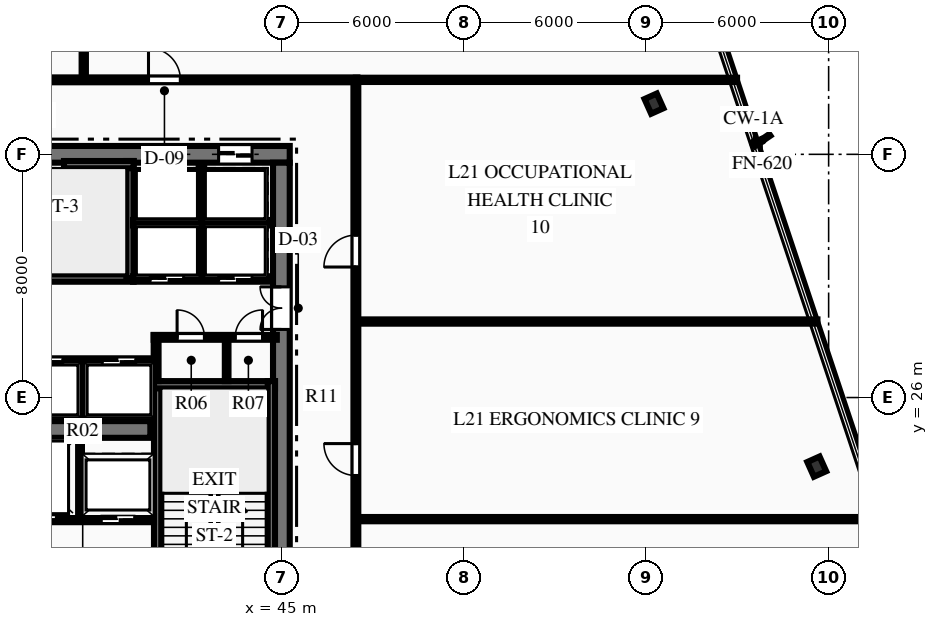
"""IFC4 building model, lengths in metres.
Left out: names, types, materials, properties, quantities, classifications, styles, units other than length and angle.
Written with IfcOpenShell. Run it as: python <this file> out.ifc"""

import sys

from ifc_helpers import new_model, si_unit, direction, frame, frame_2d, origin, origin_2d, place, context, subcontext, project, spatial, rectangle, i_section, extrude, element, fill, save


model = new_model("IFC4")
c1 = context("Model", 3, precision=1e-05, world=origin(), true_north=direction((0.0, 1.0)))
c2 = subcontext(c1, "Body", "Model", "MODEL_VIEW")
j1 = project(units=[si_unit("LENGTHUNIT", "METRE"), si_unit("PLANEANGLEUNIT", "RADIAN")], contexts=[c1])
p1 = place(None, origin())
s1 = spatial("IfcSite", under=j1, at=p1, CompositionType="ELEMENT")
p2 = place(p1, origin())
s2 = spatial("IfcBuilding", under=s1, at=p2, CompositionType="ELEMENT")
p3 = place(p2, frame((0.0, 0.0, 90.45)))
s3 = spatial("IfcBuildingStorey", under=s2, at=p3, CompositionType="ELEMENT", Elevation=90.45)
p4 = place(p3, frame((26.725, 34.0, 0.0), z_axis=(0.0, 0.0, 1.0), x_axis=(1.0, 0.0, 0.0)))
e1 = element("IfcWall", 1, at=p4, inside=s3, PredefinedType="SHEAR", context=c2, shape_type="SweptSolid", body=[
    extrude(rectangle(XDim=18.55, YDim=0.55, at=frame_2d((9.275, 0.0))), origin(), (0.0, 0.0, 1.0), 3.75),
])
p5 = place(p4, frame((1.24, 0.0, 0.0)))
e2 = element("IfcOpeningElement", 2, at=p5, cuts=e1, PredefinedType="OPENING", context=c2, shape_type="SweptSolid", body=[
    extrude(rectangle(XDim=1.1, YDim=2.15, at=frame_2d((0.55, 1.075))), frame((0.0, 0.285, 0.0), z_axis=(0.0, -1.0, 0.0), x_axis=(1.0, 0.0, 0.0)), (0.0, 0.0, 1.0), 0.57),
])
p6 = place(p4, frame((3.49, 0.0, 0.0)))
e3 = element("IfcOpeningElement", 3, at=p6, cuts=e1, PredefinedType="OPENING", context=c2, shape_type="SweptSolid", body=[
    extrude(rectangle(XDim=1.1, YDim=2.15, at=frame_2d((0.55, 1.075))), frame((0.0, 0.285, 0.0), z_axis=(0.0, -1.0, 0.0), x_axis=(1.0, 0.0, 0.0)), (0.0, 0.0, 1.0), 0.57),
])
p7 = place(p4, frame((13.96, 0.0, 0.0)))
e4 = element("IfcOpeningElement", 4, at=p7, cuts=e1, PredefinedType="OPENING", context=c2, shape_type="SweptSolid", body=[
    extrude(rectangle(XDim=1.1, YDim=2.15, at=frame_2d((0.55, 1.075))), frame((0.0, 0.285, 0.0), z_axis=(0.0, -1.0, 0.0), x_axis=(1.0, 0.0, 0.0)), (0.0, 0.0, 1.0), 0.57),
])
p8 = place(p4, frame((16.21, 0.0, 0.0)))
e5 = element("IfcOpeningElement", 5, at=p8, cuts=e1, PredefinedType="OPENING", context=c2, shape_type="SweptSolid", body=[
    extrude(rectangle(XDim=1.1, YDim=2.15, at=frame_2d((0.55, 1.075))), frame((0.0, 0.285, 0.0), z_axis=(0.0, -1.0, 0.0), x_axis=(1.0, 0.0, 0.0)), (0.0, 0.0, 1.0), 0.57),
])
p9 = place(p3, frame((45.0, 18.275, 0.0), z_axis=(0.0, 0.0, 1.0), x_axis=(0.0, 1.0, 0.0)))
e6 = element("IfcWall", 6, at=p9, inside=s3, PredefinedType="SHEAR", context=c2, shape_type="SweptSolid", body=[
    extrude(rectangle(XDim=15.45, YDim=0.55, at=frame_2d((7.725, 0.0))), origin(), (0.0, 0.0, 1.0), 3.75),
])
p10 = place(p9, frame((9.965, 0.0, 0.0)))
e7 = element("IfcOpeningElement", 7, at=p10, cuts=e6, PredefinedType="OPENING", context=c2, shape_type="SweptSolid", body=[
    extrude(rectangle(XDim=1.4, YDim=2.2, at=frame_2d((0.7, 1.1))), frame((0.0, 0.285, 0.0), z_axis=(0.0, -1.0, 0.0), x_axis=(1.0, 0.0, 0.0)), (0.0, 0.0, 1.0), 0.57),
])
p11 = place(p3, frame((31.31, 24.95, 0.0), z_axis=(0.0, 0.0, 1.0), x_axis=(1.0, 0.0, 0.0)))
e8 = element("IfcWall", 8, at=p11, inside=s3, PredefinedType="SHEAR", context=c2, shape_type="SweptSolid", body=[
    extrude(rectangle(XDim=9.38, YDim=0.55, at=frame_2d((4.69, 0.0))), origin(), (0.0, 0.0, 1.0), 3.75),
])
p12 = place(p3, frame((40.93, 18.28, 0.0), z_axis=(0.0, 0.0, 1.0), x_axis=(0.0, 1.0, 0.0)))
e9 = element("IfcWall", 9, at=p12, inside=s3, PredefinedType="SHEAR", context=c2, shape_type="SweptSolid", body=[
    extrude(rectangle(XDim=8.26, YDim=0.24, at=frame_2d((4.13, 0.0))), origin(), (0.0, 0.0, 1.0), 3.75),
])
p13 = place(p12, frame((0.365, 0.0, 0.0)))
e10 = element("IfcOpeningElement", 10, at=p13, cuts=e9, PredefinedType="OPENING", context=c2, shape_type="SweptSolid", body=[
    extrude(rectangle(XDim=1.05, YDim=2.15, at=frame_2d((0.525, 1.075))), frame((0.0, 0.13, 0.0), z_axis=(0.0, -1.0, 0.0), x_axis=(1.0, 0.0, 0.0)), (0.0, 0.0, 1.0), 0.26),
])
p14 = place(p3, frame((40.81, 26.42, 0.0), z_axis=(0.0, 0.0, 1.0), x_axis=(1.0, 0.0, 0.0)))
e11 = element("IfcWall", 11, at=p14, inside=s3, PredefinedType="SHEAR", context=c2, shape_type="SweptSolid", body=[
    extrude(rectangle(XDim=3.98, YDim=0.24, at=frame_2d((1.99, 0.0))), origin(), (0.0, 0.0, 1.0), 3.75),
])
p15 = place(p3, frame((44.67, 18.28, 0.0), z_axis=(0.0, 0.0, 1.0), x_axis=(0.0, 1.0, 0.0)))
e12 = element("IfcWall", 12, at=p15, inside=s3, PredefinedType="SHEAR", context=c2, shape_type="SweptSolid", body=[
    extrude(rectangle(XDim=8.26, YDim=0.24, at=frame_2d((4.13, 0.0))), origin(), (0.0, 0.0, 1.0), 3.75),
])
p16 = place(p3, frame((31.76, 29.93, 0.0), z_axis=(0.0, 0.0, 1.0), x_axis=(1.0, 0.0, 0.0)))
e13 = element("IfcWall", 13, at=p16, inside=s3, PredefinedType="SHEAR", context=c2, shape_type="SweptSolid", body=[
    extrude(rectangle(XDim=8.38, YDim=0.24, at=frame_2d((4.19, 0.0))), origin(), (0.0, 0.0, 1.0), 3.75),
])
p17 = place(p16, frame((0.565, 0.0, 0.0)))
e14 = element("IfcOpeningElement", 14, at=p17, cuts=e13, PredefinedType="OPENING", context=c2, shape_type="SweptSolid", body=[
    extrude(rectangle(XDim=1.05, YDim=2.15, at=frame_2d((0.525, 1.075))), frame((0.0, 0.13, 0.0), z_axis=(0.0, -1.0, 0.0), x_axis=(1.0, 0.0, 0.0)), (0.0, 0.0, 1.0), 0.26),
])
p18 = place(p3, frame((40.02, 29.93, 0.0), z_axis=(0.0, 0.0, 1.0), x_axis=(0.0, 1.0, 0.0)))
e15 = element("IfcWall", 15, at=p18, inside=s3, PredefinedType="SHEAR", context=c2, shape_type="SweptSolid", body=[
    extrude(rectangle(XDim=3.85, YDim=0.24, at=frame_2d((1.925, 0.0))), origin(), (0.0, 0.0, 1.0), 3.75),
])
p19 = place(p3, frame((37.85, 33.66, 0.0), z_axis=(0.0, 0.0, 1.0), x_axis=(1.0, 0.0, 0.0)))
e16 = element("IfcWall", 16, at=p19, inside=s3, PredefinedType="SHEAR", context=c2, shape_type="SweptSolid", body=[
    extrude(rectangle(XDim=2.29, YDim=0.24, at=frame_2d((1.145, 0.0))), origin(), (0.0, 0.0, 1.0), 3.75),
])
for number, where, z_axis, x_axis in (
    (17, (62.609, 23.727, 0.0), (0.0, 0.0, 1.0), (0.912, 0.409, 0.0)),
    (18, (57.255, 35.667, 0.0), (0.0, 0.0, 1.0), (0.912, 0.409, 0.0)),
):
    element("IfcColumn", number, at=place(p3, frame(where, z_axis=z_axis, x_axis=x_axis)), inside=s3, PredefinedType="COLUMN", context=c2, shape_type="SweptSolid", body=[
        extrude(i_section(OverallWidth=0.442, OverallDepth=0.531, WebThickness=0.066, FlangeThickness=0.106, at=origin_2d()), origin(), (0.0, 0.0, 1.0), 3.75),
    ])
p20 = place(p3, frame((36.12, 22.0, 0.0), z_axis=(0.0, 0.0, 1.0), x_axis=(1.0, 0.0, 0.0)))
e19 = element("IfcWall", 19, at=p20, inside=s3, PredefinedType="PARTITIONING", context=c2, shape_type="SweptSolid", body=[
    extrude(rectangle(XDim=4.69, YDim=0.2, at=frame_2d((2.345, 0.0))), origin(), (0.0, 0.0, 1.0), 3.45),
])
p21 = place(p20, frame((2.955, 0.0, 0.0)))
e20 = element("IfcOpeningElement", 20, at=p21, cuts=e19, PredefinedType="OPENING", context=c2, shape_type="SweptSolid", body=[
    extrude(rectangle(XDim=1.1, YDim=2.15, at=frame_2d((0.55, 1.075))), frame((0.0, 0.11, 0.0), z_axis=(0.0, -1.0, 0.0), x_axis=(1.0, 0.0, 0.0)), (0.0, 0.0, 1.0), 0.22),
])
p22 = place(p20, frame((0.08, 0.0, 0.0)))
e21 = element("IfcOpeningElement", 21, at=p22, cuts=e19, PredefinedType="OPENING", context=c2, shape_type="SweptSolid", body=[
    extrude(rectangle(XDim=1.4, YDim=2.2, at=frame_2d((0.7, 1.1))), frame((0.0, 0.11, 0.0), z_axis=(0.0, -1.0, 0.0), x_axis=(1.0, 0.0, 0.0)), (0.0, 0.0, 1.0), 0.22),
])
p23 = place(p3, frame((38.35, 22.05, 0.0), z_axis=(0.0, 0.0, 1.0), x_axis=(0.0, 1.0, 0.0)))
e22 = element("IfcWall", 22, at=p23, inside=s3, PredefinedType="PARTITIONING", context=c2, shape_type="SweptSolid", body=[
    extrude(rectangle(XDim=2.6, YDim=0.18, at=frame_2d((1.3, 0.0))), origin(), (0.0, 0.0, 1.0), 3.45),
])
p24 = place(p3, frame((40.8, 27.98, 0.0), z_axis=(0.0, 0.0, 1.0), x_axis=(1.0, 0.0, 0.0)))
e23 = element("IfcWall", 23, at=p24, inside=s3, PredefinedType="PARTITIONING", context=c2, shape_type="SweptSolid", body=[
    extrude(rectangle(XDim=4.05, YDim=0.16, at=frame_2d((2.025, 0.0))), origin(), (0.0, 0.0, 1.0), 3.45),
])
p25 = place(p24, frame((0.77, 0.0, 0.0)))
e24 = element("IfcOpeningElement", 24, at=p25, cuts=e23, PredefinedType="OPENING", context=c2, shape_type="SweptSolid", body=[
    extrude(rectangle(XDim=0.9, YDim=2.15, at=frame_2d((0.45, 1.075))), frame((0.0, 0.09, 0.0), z_axis=(0.0, -1.0, 0.0), x_axis=(1.0, 0.0, 0.0)), (0.0, 0.0, 1.0), 0.18),
])
p26 = place(p24, frame((2.68, 0.0, 0.0)))
e25 = element("IfcOpeningElement", 25, at=p26, cuts=e23, PredefinedType="OPENING", context=c2, shape_type="SweptSolid", body=[
    extrude(rectangle(XDim=0.9, YDim=2.15, at=frame_2d((0.45, 1.075))), frame((0.0, 0.09, 0.0), z_axis=(0.0, -1.0, 0.0), x_axis=(1.0, 0.0, 0.0)), (0.0, 0.0, 1.0), 0.18),
])
p27 = place(p3, frame((40.88, 26.54, 0.0), z_axis=(0.0, 0.0, 1.0), x_axis=(0.0, 1.0, 0.0)))
e26 = element("IfcWall", 26, at=p27, inside=s3, PredefinedType="PARTITIONING", context=c2, shape_type="SweptSolid", body=[
    extrude(rectangle(XDim=1.51, YDim=0.16, at=frame_2d((0.755, 0.0))), origin(), (0.0, 0.0, 1.0), 3.45),
])
p28 = place(p3, frame((43.2, 26.54, 0.0), z_axis=(0.0, 0.0, 1.0), x_axis=(0.0, 1.0, 0.0)))
e27 = element("IfcWall", 27, at=p28, inside=s3, PredefinedType="PARTITIONING", context=c2, shape_type="SweptSolid", body=[
    extrude(rectangle(XDim=1.44, YDim=0.12, at=frame_2d((0.72, 0.0))), origin(), (0.0, 0.0, 1.0), 3.45),
])
p29 = place(p3, frame((40.12, 29.9, 0.0), z_axis=(0.0, 0.0, 1.0), x_axis=(1.0, 0.0, 0.0)))
e28 = element("IfcWall", 28, at=p29, inside=s3, PredefinedType="PARTITIONING", context=c2, shape_type="SweptSolid", body=[
    extrude(rectangle(XDim=4.43, YDim=0.18, at=frame_2d((2.215, 0.0))), origin(), (0.0, 0.0, 1.0), 3.45),
])
p30 = place(p29, frame((0.565, 0.0, 0.0)))
e29 = element("IfcOpeningElement", 29, at=p30, cuts=e28, PredefinedType="OPENING", context=c2, shape_type="SweptSolid", body=[
    extrude(rectangle(XDim=1.1, YDim=2.15, at=frame_2d((0.55, 1.075))), frame((0.0, 0.1, 0.0), z_axis=(0.0, -1.0, 0.0), x_axis=(1.0, 0.0, 0.0)), (0.0, 0.0, 1.0), 0.2),
])
p31 = place(p29, frame((2.815, 0.0, 0.0)))
e30 = element("IfcOpeningElement", 30, at=p31, cuts=e28, PredefinedType="OPENING", context=c2, shape_type="SweptSolid", body=[
    extrude(rectangle(XDim=1.1, YDim=2.15, at=frame_2d((0.55, 1.075))), frame((0.0, 0.1, 0.0), z_axis=(0.0, -1.0, 0.0), x_axis=(1.0, 0.0, 0.0)), (0.0, 0.0, 1.0), 0.2),
])
p32 = place(p3, frame((40.12, 31.75, 0.0), z_axis=(0.0, 0.0, 1.0), x_axis=(1.0, 0.0, 0.0)))
e31 = element("IfcWall", 31, at=p32, inside=s3, PredefinedType="PARTITIONING", context=c2, shape_type="SweptSolid", body=[
    extrude(rectangle(XDim=4.43, YDim=0.18, at=frame_2d((2.215, 0.0))), origin(), (0.0, 0.0, 1.0), 3.45),
])
p33 = place(p3, frame((42.37, 29.9, 0.0), z_axis=(0.0, 0.0, 1.0), x_axis=(0.0, 1.0, 0.0)))
e32 = element("IfcWall", 32, at=p33, inside=s3, PredefinedType="PARTITIONING", context=c2, shape_type="SweptSolid", body=[
    extrude(rectangle(XDim=3.75, YDim=0.18, at=frame_2d((1.875, 0.0))), origin(), (0.0, 0.0, 1.0), 3.45),
])
p34 = place(p3, frame((31.2, 27.2, 0.0), z_axis=(0.0, 0.0, 1.0), x_axis=(1.0, 0.0, 0.0)))
e33 = element("IfcWall", 33, at=p34, inside=s3, PredefinedType="PARTITIONING", context=c2, shape_type="SweptSolid", body=[
    extrude(rectangle(XDim=9.6, YDim=0.18, at=frame_2d((4.8, 0.0))), origin(), (0.0, 0.0, 1.0), 3.45),
])
p35 = place(p34, frame((0.59, 0.0, 0.0)))
e34 = element("IfcOpeningElement", 34, at=p35, cuts=e33, PredefinedType="OPENING", context=c2, shape_type="SweptSolid", body=[
    extrude(rectangle(XDim=1.1, YDim=2.15, at=frame_2d((0.55, 1.075))), frame((0.0, 0.1, 0.0), z_axis=(0.0, -1.0, 0.0), x_axis=(1.0, 0.0, 0.0)), (0.0, 0.0, 1.0), 0.2),
])
p36 = place(p34, frame((2.99, 0.0, 0.0)))
e35 = element("IfcOpeningElement", 35, at=p36, cuts=e33, PredefinedType="OPENING", context=c2, shape_type="SweptSolid", body=[
    extrude(rectangle(XDim=1.1, YDim=2.15, at=frame_2d((0.55, 1.075))), frame((0.0, 0.1, 0.0), z_axis=(0.0, -1.0, 0.0), x_axis=(1.0, 0.0, 0.0)), (0.0, 0.0, 1.0), 0.2),
])
p37 = place(p34, frame((5.51, 0.0, 0.0)))
e36 = element("IfcOpeningElement", 36, at=p37, cuts=e33, PredefinedType="OPENING", context=c2, shape_type="SweptSolid", body=[
    extrude(rectangle(XDim=1.1, YDim=2.15, at=frame_2d((0.55, 1.075))), frame((0.0, 0.1, 0.0), z_axis=(0.0, -1.0, 0.0), x_axis=(1.0, 0.0, 0.0)), (0.0, 0.0, 1.0), 0.2),
])
p38 = place(p34, frame((7.91, 0.0, 0.0)))
e37 = element("IfcOpeningElement", 37, at=p38, cuts=e33, PredefinedType="OPENING", context=c2, shape_type="SweptSolid", body=[
    extrude(rectangle(XDim=1.1, YDim=2.15, at=frame_2d((0.55, 1.075))), frame((0.0, 0.1, 0.0), z_axis=(0.0, -1.0, 0.0), x_axis=(1.0, 0.0, 0.0)), (0.0, 0.0, 1.0), 0.2),
])
p39 = place(p3, frame((38.46, 25.3, 0.0), z_axis=(0.0, 0.0, 1.0), x_axis=(0.0, 1.0, 0.0)))
e38 = element("IfcWall", 38, at=p39, inside=s3, PredefinedType="PARTITIONING", context=c2, shape_type="SweptSolid", body=[
    extrude(rectangle(XDim=1.9, YDim=0.18, at=frame_2d((0.95, 0.0))), origin(), (0.0, 0.0, 1.0), 3.45),
])
p40 = place(p3, frame((24.5, 36.45, 0.0), z_axis=(0.0, 0.0, 1.0), x_axis=(1.0, 0.0, 0.0)))
e39 = element("IfcWall", 39, at=p40, inside=s3, PredefinedType="PARTITIONING", context=c2, shape_type="SweptSolid", body=[
    extrude(rectangle(XDim=23.0, YDim=0.16, at=frame_2d((11.5, 0.0))), origin(), (0.0, 0.0, 1.0), 3.45),
])
p41 = place(p40, frame((0.53, 0.0, 0.0)))
e40 = element("IfcOpeningElement", 40, at=p41, cuts=e39, PredefinedType="OPENING", context=c2, shape_type="SweptSolid", body=[
    extrude(rectangle(XDim=1.05, YDim=2.15, at=frame_2d((0.525, 1.075))), frame((0.0, 0.09, 0.0), z_axis=(0.0, -1.0, 0.0), x_axis=(1.0, 0.0, 0.0)), (0.0, 0.0, 1.0), 0.18),
])
p42 = place(p40, frame((9.755, 0.0, 0.0)))
e41 = element("IfcOpeningElement", 41, at=p42, cuts=e39, PredefinedType="OPENING", context=c2, shape_type="SweptSolid", body=[
    extrude(rectangle(XDim=1.05, YDim=2.15, at=frame_2d((0.525, 1.075))), frame((0.0, 0.09, 0.0), z_axis=(0.0, -1.0, 0.0), x_axis=(1.0, 0.0, 0.0)), (0.0, 0.0, 1.0), 0.18),
])
p43 = place(p40, frame((16.129, 0.0, 0.0)))
e42 = element("IfcOpeningElement", 42, at=p43, cuts=e39, PredefinedType="OPENING", context=c2, shape_type="SweptSolid", body=[
    extrude(rectangle(XDim=1.05, YDim=2.15, at=frame_2d((0.525, 1.075))), frame((0.0, 0.09, 0.0), z_axis=(0.0, -1.0, 0.0), x_axis=(1.0, 0.0, 0.0)), (0.0, 0.0, 1.0), 0.18),
])
p44 = place(p3, frame((47.45, 15.55, 0.0), z_axis=(0.0, 0.0, 1.0), x_axis=(0.0, 1.0, 0.0)))
e43 = element("IfcWall", 43, at=p44, inside=s3, PredefinedType="PARTITIONING", context=c2, shape_type="SweptSolid", body=[
    extrude(rectangle(XDim=20.9, YDim=0.16, at=frame_2d((10.45, 0.0))), origin(), (0.0, 0.0, 1.0), 3.45),
])
p45 = place(p44, frame((4.087, 0.0, 0.0)))
e44 = element("IfcOpeningElement", 44, at=p45, cuts=e43, PredefinedType="OPENING", context=c2, shape_type="SweptSolid", body=[
    extrude(rectangle(XDim=1.05, YDim=2.15, at=frame_2d((0.525, 1.075))), frame((0.0, 0.09, 0.0), z_axis=(0.0, -1.0, 0.0), x_axis=(1.0, 0.0, 0.0)), (0.0, 0.0, 1.0), 0.18),
])
p46 = place(p44, frame((7.885, 0.0, 0.0)))
e45 = element("IfcOpeningElement", 45, at=p46, cuts=e43, PredefinedType="OPENING", context=c2, shape_type="SweptSolid", body=[
    extrude(rectangle(XDim=1.05, YDim=2.15, at=frame_2d((0.525, 1.075))), frame((0.0, 0.09, 0.0), z_axis=(0.0, -1.0, 0.0), x_axis=(1.0, 0.0, 0.0)), (0.0, 0.0, 1.0), 0.18),
])
p47 = place(p44, frame((14.743, 0.0, 0.0)))
e46 = element("IfcOpeningElement", 46, at=p47, cuts=e43, PredefinedType="OPENING", context=c2, shape_type="SweptSolid", body=[
    extrude(rectangle(XDim=1.05, YDim=2.15, at=frame_2d((0.525, 1.075))), frame((0.0, 0.09, 0.0), z_axis=(0.0, -1.0, 0.0), x_axis=(1.0, 0.0, 0.0)), (0.0, 0.0, 1.0), 0.18),
])
p48 = place(p3, frame((47.45, 36.45, 0.0), z_axis=(0.0, 0.0, 1.0), x_axis=(1.0, 0.0, 0.0)))
e47 = element("IfcWall", 47, at=p48, inside=s3, PredefinedType="PARTITIONING", context=c2, shape_type="SweptSolid", body=[
    extrude(rectangle(XDim=12.538, YDim=0.14, at=frame_2d((6.269, 0.0))), origin(), (0.0, 0.0, 1.0), 3.45),
])
p49 = place(p3, frame((38.5, 36.45, 0.0), z_axis=(0.0, 0.0, 1.0), x_axis=(0.0, 1.0, 0.0)))
e48 = element("IfcWall", 48, at=p49, inside=s3, PredefinedType="PARTITIONING", context=c2, shape_type="SweptSolid", body=[
    extrude(rectangle(XDim=16.581, YDim=0.14, at=frame_2d((8.291, 0.0))), origin(), (0.0, 0.0, 1.0), 3.45),
])
p50 = place(p3, frame((47.45, 22.0, 0.0), z_axis=(0.0, 0.0, 1.0), x_axis=(1.0, 0.0, 0.0)))
e49 = element("IfcWall", 49, at=p50, inside=s3, PredefinedType="PARTITIONING", context=c2, shape_type="SweptSolid", body=[
    extrude(rectangle(XDim=17.345, YDim=0.14, at=frame_2d((8.672, 0.0))), origin(), (0.0, 0.0, 1.0), 3.45),
])
p51 = place(p3, frame((47.45, 28.5, 0.0), z_axis=(0.0, 0.0, 1.0), x_axis=(1.0, 0.0, 0.0)))
e50 = element("IfcWall", 50, at=p51, inside=s3, PredefinedType="PARTITIONING", context=c2, shape_type="SweptSolid", body=[
    extrude(rectangle(XDim=15.183, YDim=0.14, at=frame_2d((7.591, 0.0))), origin(), (0.0, 0.0, 1.0), 3.45),
])
p52 = place(p25, origin())
e51 = element("IfcDoor", 51, at=p52, inside=s3, OperationType="SINGLE_SWING_LEFT", PredefinedType="DOOR", context=c2, shape_type="SweptSolid", body=[
    extrude(rectangle(XDim=0.9, YDim=2.15, at=frame_2d((0.45, 1.075))), frame((0.0, 0.025, 0.0), z_axis=(0.0, -1.0, 0.0), x_axis=(1.0, 0.0, 0.0)), (0.0, 0.0, 1.0), 0.05),
])
fill(e24, e51)
p53 = place(p26, origin())
e52 = element("IfcDoor", 52, at=p53, inside=s3, OperationType="SINGLE_SWING_RIGHT", PredefinedType="DOOR", context=c2, shape_type="SweptSolid", body=[
    extrude(rectangle(XDim=0.9, YDim=2.15, at=frame_2d((0.45, 1.075))), frame((0.0, 0.025, 0.0), z_axis=(0.0, -1.0, 0.0), x_axis=(1.0, 0.0, 0.0)), (0.0, 0.0, 1.0), 0.05),
])
fill(e25, e52)
p54 = place(p10, origin())
e53 = element("IfcDoor", 53, at=p54, inside=s3, OperationType="DOUBLE_DOOR_SINGLE_SWING", PredefinedType="DOOR", context=c2, shape_type="SweptSolid", body=[
    extrude(rectangle(XDim=1.4, YDim=2.2, at=frame_2d((0.7, 1.1))), frame((0.0, 0.025, 0.0), z_axis=(0.0, -1.0, 0.0), x_axis=(1.0, 0.0, 0.0)), (0.0, 0.0, 1.0), 0.05),
])
fill(e7, e53)
p55 = place(p43, origin())
e54 = element("IfcDoor", 54, at=p55, inside=s3, OperationType="SINGLE_SWING_LEFT", PredefinedType="DOOR", context=c2, shape_type="SweptSolid", body=[
    extrude(rectangle(XDim=1.05, YDim=2.15, at=frame_2d((0.525, 1.075))), frame((0.0, 0.025, 0.0), z_axis=(0.0, -1.0, 0.0), x_axis=(1.0, 0.0, 0.0)), (0.0, 0.0, 1.0), 0.05),
])
fill(e42, e54)
p56 = place(p46, origin())
e55 = element("IfcDoor", 55, at=p56, inside=s3, OperationType="SINGLE_SWING_RIGHT", PredefinedType="DOOR", context=c2, shape_type="SweptSolid", body=[
    extrude(rectangle(XDim=1.05, YDim=2.15, at=frame_2d((0.525, 1.075))), frame((0.0, 0.025, 0.0), z_axis=(0.0, -1.0, 0.0), x_axis=(1.0, 0.0, 0.0)), (0.0, 0.0, 1.0), 0.05),
])
fill(e45, e55)
p57 = place(p47, origin())
e56 = element("IfcDoor", 56, at=p57, inside=s3, OperationType="SINGLE_SWING_LEFT", PredefinedType="DOOR", context=c2, shape_type="SweptSolid", body=[
    extrude(rectangle(XDim=1.05, YDim=2.15, at=frame_2d((0.525, 1.075))), frame((0.0, 0.025, 0.0), z_axis=(0.0, -1.0, 0.0), x_axis=(1.0, 0.0, 0.0)), (0.0, 0.0, 1.0), 0.05),
])
fill(e46, e56)
p58 = place(p30, origin())
e57 = element("IfcDoor", 57, at=p58, inside=s3, OperationType="SLIDING_TO_LEFT", PredefinedType="DOOR", context=c2, shape_type="SweptSolid", body=[
    extrude(rectangle(XDim=1.1, YDim=2.15, at=frame_2d((0.55, 1.075))), frame((0.0, 0.025, 0.0), z_axis=(0.0, -1.0, 0.0), x_axis=(1.0, 0.0, 0.0)), (0.0, 0.0, 1.0), 0.05),
])
fill(e29, e57)
p59 = place(p31, origin())
e58 = element("IfcDoor", 58, at=p59, inside=s3, OperationType="SLIDING_TO_LEFT", PredefinedType="DOOR", context=c2, shape_type="SweptSolid", body=[
    extrude(rectangle(XDim=1.1, YDim=2.15, at=frame_2d((0.55, 1.075))), frame((0.0, 0.025, 0.0), z_axis=(0.0, -1.0, 0.0), x_axis=(1.0, 0.0, 0.0)), (0.0, 0.0, 1.0), 0.05),
])
fill(e30, e58)
p60 = place(p7, origin())
e59 = element("IfcDoor", 59, at=p60, inside=s3, OperationType="SLIDING_TO_LEFT", PredefinedType="DOOR", context=c2, shape_type="SweptSolid", body=[
    extrude(rectangle(XDim=1.1, YDim=2.15, at=frame_2d((0.55, 1.075))), frame((0.0, 0.025, 0.0), z_axis=(0.0, -1.0, 0.0), x_axis=(1.0, 0.0, 0.0)), (0.0, 0.0, 1.0), 0.05),
])
fill(e4, e59)
p61 = place(p8, origin())
e60 = element("IfcDoor", 60, at=p61, inside=s3, OperationType="SLIDING_TO_LEFT", PredefinedType="DOOR", context=c2, shape_type="SweptSolid", body=[
    extrude(rectangle(XDim=1.1, YDim=2.15, at=frame_2d((0.55, 1.075))), frame((0.0, 0.025, 0.0), z_axis=(0.0, -1.0, 0.0), x_axis=(1.0, 0.0, 0.0)), (0.0, 0.0, 1.0), 0.05),
])
fill(e5, e60)
p62 = place(p37, origin())
e61 = element("IfcDoor", 61, at=p62, inside=s3, OperationType="SLIDING_TO_LEFT", PredefinedType="DOOR", context=c2, shape_type="SweptSolid", body=[
    extrude(rectangle(XDim=1.1, YDim=2.15, at=frame_2d((0.55, 1.075))), frame((0.0, 0.025, 0.0), z_axis=(0.0, -1.0, 0.0), x_axis=(1.0, 0.0, 0.0)), (0.0, 0.0, 1.0), 0.05),
])
fill(e36, e61)
p63 = place(p38, origin())
e62 = element("IfcDoor", 62, at=p63, inside=s3, OperationType="SLIDING_TO_LEFT", PredefinedType="DOOR", context=c2, shape_type="SweptSolid", body=[
    extrude(rectangle(XDim=1.1, YDim=2.15, at=frame_2d((0.55, 1.075))), frame((0.0, 0.025, 0.0), z_axis=(0.0, -1.0, 0.0), x_axis=(1.0, 0.0, 0.0)), (0.0, 0.0, 1.0), 0.05),
])
fill(e37, e62)
p64 = place(p21, origin())
e63 = element("IfcDoor", 63, at=p64, inside=s3, OperationType="SLIDING_TO_LEFT", PredefinedType="DOOR", context=c2, shape_type="SweptSolid", body=[
    extrude(rectangle(XDim=1.1, YDim=2.15, at=frame_2d((0.55, 1.075))), frame((0.0, 0.025, 0.0), z_axis=(0.0, -1.0, 0.0), x_axis=(1.0, 0.0, 0.0)), (0.0, 0.0, 1.0), 0.05),
])
fill(e20, e63)
p65 = place(p22, origin())
e64 = element("IfcDoor", 64, at=p65, inside=s3, OperationType="SLIDING_TO_LEFT", PredefinedType="DOOR", context=c2, shape_type="SweptSolid", body=[
    extrude(rectangle(XDim=1.4, YDim=2.2, at=frame_2d((0.7, 1.1))), frame((0.0, 0.025, 0.0), z_axis=(0.0, -1.0, 0.0), x_axis=(1.0, 0.0, 0.0)), (0.0, 0.0, 1.0), 0.05),
])
fill(e21, e64)
save(model, sys.argv[1])
